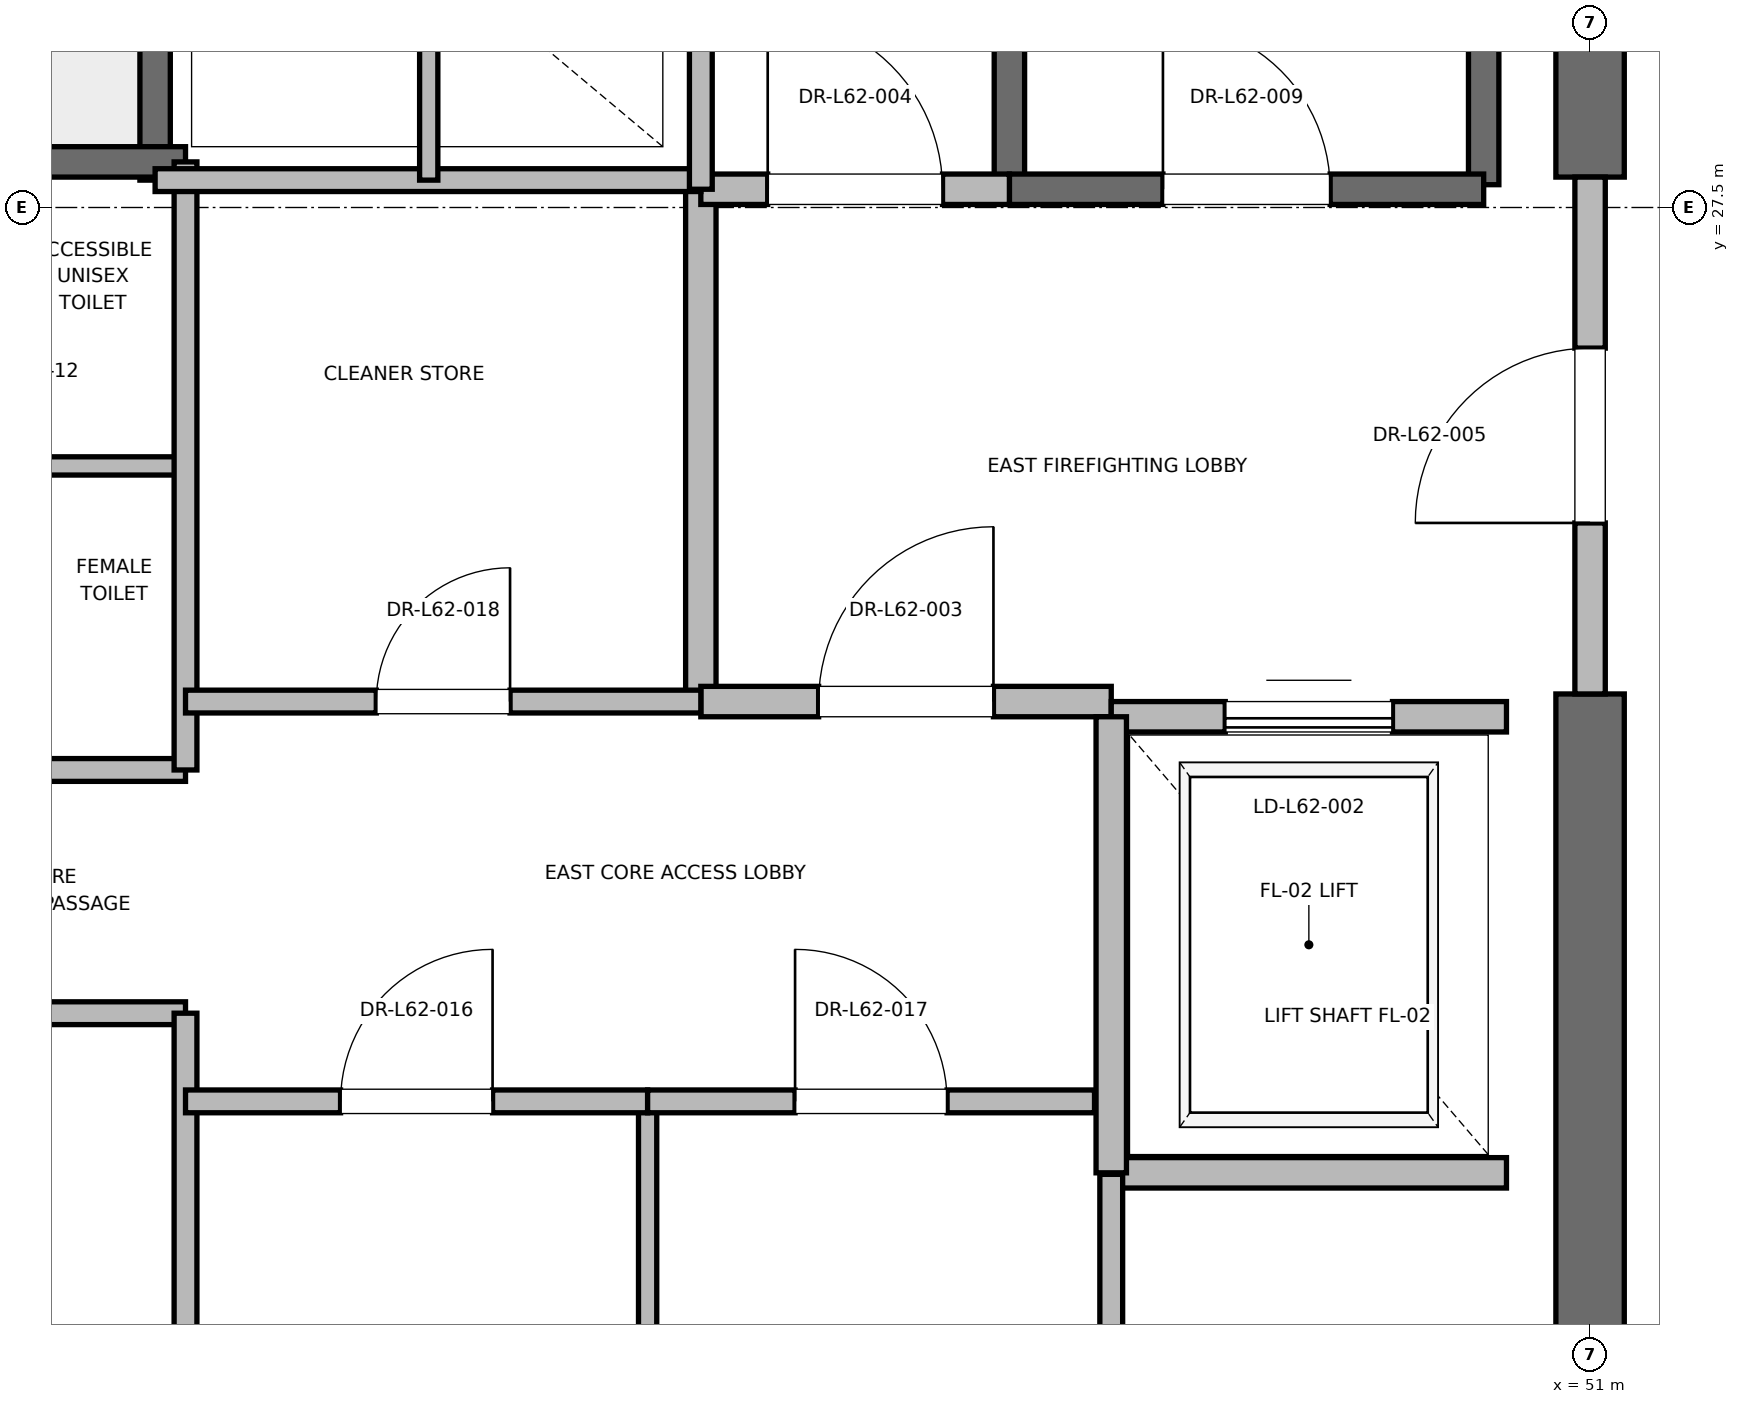
"""IFC4 building model, lengths in metres.
Left out: names, types, materials, properties, quantities, classifications, styles, units other than length and angle.
Written with IfcOpenShell. Run it as: python <this file> out.ifc"""

import sys

from ifc_helpers import new_model, si_unit, direction, frame, frame_2d, origin, place, context, subcontext, project, spatial, rectangle, extrude, element, fill, save


model = new_model("IFC4")
c1 = context("Model", 3, precision=1e-05, world=origin(), true_north=direction((0.0, 1.0)))
c2 = subcontext(c1, "Body", "Model", "MODEL_VIEW")
j1 = project(units=[si_unit("LENGTHUNIT", "METRE"), si_unit("PLANEANGLEUNIT", "RADIAN")], contexts=[c1])
p1 = place(None, origin())
s1 = spatial("IfcSite", under=j1, at=p1, CompositionType="ELEMENT")
p2 = place(p1, origin())
s2 = spatial("IfcBuilding", under=s1, at=p2, CompositionType="ELEMENT")
p3 = place(p2, frame((0.0, 0.0, 267.2)))
s3 = spatial("IfcBuildingStorey", under=s2, at=p3, CompositionType="ELEMENT", Elevation=267.2)
p4 = place(p3, frame((51.0, 18.5, 0.0), z_axis=(0.0, 0.0, 1.0), x_axis=(0.0, 1.0, 0.0)))
e1 = element("IfcWall", 1, at=p4, inside=s3, PredefinedType="SHEAR", context=c2, shape_type="SweptSolid", body=[
    extrude(rectangle(XDim=5.8, YDim=0.45, at=frame_2d((2.9, 0.0))), origin(), (0.0, 0.0, 1.0), 3.785),
])
p5 = place(p3, frame((51.0, 27.7, 0.0), z_axis=(0.0, 0.0, 1.0), x_axis=(0.0, 1.0, 0.0)))
e2 = element("IfcWall", 2, at=p5, inside=s3, PredefinedType="SHEAR", context=c2, shape_type="SweptSolid", body=[
    extrude(rectangle(XDim=8.8, YDim=0.45, at=frame_2d((4.4, 0.0))), origin(), (0.0, 0.0, 1.0), 3.785),
])
p6 = place(p3, frame((50.3, 27.65, 0.0), z_axis=(0.0, 0.0, 1.0), x_axis=(0.0, 1.0, 0.0)))
e3 = element("IfcWall", 3, at=p6, inside=s3, PredefinedType="SOLIDWALL", context=c2, shape_type="SweptSolid", body=[
    extrude(rectangle(XDim=8.15, YDim=0.2, at=frame_2d((4.075, 0.0))), origin(), (0.0, 0.0, 1.0), 3.785),
])
p7 = place(p3, frame((47.18, 27.62, 0.0), z_axis=(0.0, 0.0, 1.0), x_axis=(0.0, 1.0, 0.0)))
e4 = element("IfcWall", 4, at=p7, inside=s3, PredefinedType="SOLIDWALL", context=c2, shape_type="SweptSolid", body=[
    extrude(rectangle(XDim=8.18, YDim=0.2, at=frame_2d((4.09, 0.0))), origin(), (0.0, 0.0, 1.0), 3.785),
])
p8 = place(p3, frame((47.18, 27.62, 0.0), z_axis=(0.0, 0.0, 1.0), x_axis=(1.0, 0.0, 0.0)))
e5 = element("IfcWall", 5, at=p8, inside=s3, PredefinedType="SOLIDWALL", context=c2, shape_type="SweptSolid", body=[
    extrude(rectangle(XDim=3.12, YDim=0.2, at=frame_2d((1.56, 0.0))), origin(), (0.0, 0.0, 1.0), 3.785),
])
p9 = place(p8, frame((1.01, 0.0, 0.0)))
e6 = element("IfcOpeningElement", 6, at=p9, cuts=e5, PredefinedType="OPENING", context=c2, shape_type="SweptSolid", body=[
    extrude(rectangle(XDim=1.1, YDim=2.15, at=frame_2d((0.55, 1.075))), frame((0.0, 0.1, 0.0), z_axis=(0.0, -1.0, 0.0), x_axis=(1.0, 0.0, 0.0)), (0.0, 0.0, 1.0), 0.2),
])
p10 = place(p3, frame((41.56, 27.68, 0.0), z_axis=(0.0, 0.0, 1.0), x_axis=(0.0, 1.0, 0.0)))
e7 = element("IfcWall", 7, at=p10, inside=s3, PredefinedType="SOLIDWALL", context=c2, shape_type="SweptSolid", body=[
    extrude(rectangle(XDim=8.57, YDim=0.2, at=frame_2d((4.285, 0.0))), origin(), (0.0, 0.0, 1.0), 3.785),
])
p11 = place(p3, frame((38.44, 27.8, 0.0), z_axis=(0.0, 0.0, 1.0), x_axis=(1.0, 0.0, 0.0)))
e8 = element("IfcWall", 8, at=p11, inside=s3, PredefinedType="SOLIDWALL", context=c2, shape_type="SweptSolid", body=[
    extrude(rectangle(XDim=3.32, YDim=0.2, at=frame_2d((1.66, 0.0))), origin(), (0.0, 0.0, 1.0), 3.785),
])
p12 = place(p3, frame((45.15, 24.25, 0.0), z_axis=(0.0, 0.0, 1.0), x_axis=(0.0, 1.0, 0.0)))
e9 = element("IfcWall", 9, at=p12, inside=s3, PredefinedType="PARTITIONING", context=c2, shape_type="SweptSolid", body=[
    extrude(rectangle(XDim=3.37, YDim=0.2, at=frame_2d((1.685, 0.0))), origin(), (0.0, 0.0, 1.0), 3.785),
])
p13 = place(p3, frame((45.15, 24.25, 0.0), z_axis=(0.0, 0.0, 1.0), x_axis=(1.0, 0.0, 0.0)))
e10 = element("IfcWall", 10, at=p13, inside=s3, PredefinedType="PARTITIONING", context=c2, shape_type="SweptSolid", body=[
    extrude(rectangle(XDim=2.7, YDim=0.2, at=frame_2d((1.35, 0.0))), origin(), (0.0, 0.0, 1.0), 3.785),
])
p14 = place(p13, frame((0.775, 0.0, 0.0)))
e11 = element("IfcOpeningElement", 11, at=p14, cuts=e10, PredefinedType="OPENING", context=c2, shape_type="SweptSolid", body=[
    extrude(rectangle(XDim=1.15, YDim=2.2, at=frame_2d((0.575, 1.1))), frame((0.0, 0.1, 0.0), z_axis=(0.0, -1.0, 0.0), x_axis=(1.0, 0.0, 0.0)), (0.0, 0.0, 1.0), 0.2),
])
p15 = place(p3, frame((45.15, 27.62, 0.0), z_axis=(0.0, 0.0, 1.0), x_axis=(1.0, 0.0, 0.0)))
e12 = element("IfcWall", 12, at=p15, inside=s3, PredefinedType="PARTITIONING", context=c2, shape_type="SweptSolid", body=[
    extrude(rectangle(XDim=2.03, YDim=0.2, at=frame_2d((1.015, 0.0))), origin(), (0.0, 0.0, 1.0), 3.785),
])
p16 = place(p15, frame((0.44, 0.0, 0.0)))
e13 = element("IfcOpeningElement", 13, at=p16, cuts=e12, PredefinedType="OPENING", context=c2, shape_type="SweptSolid", body=[
    extrude(rectangle(XDim=1.15, YDim=2.2, at=frame_2d((0.575, 1.1))), frame((0.0, 0.1, 0.0), z_axis=(0.0, -1.0, 0.0), x_axis=(1.0, 0.0, 0.0)), (0.0, 0.0, 1.0), 0.2),
])
p17 = place(p3, frame((51.0, 24.3, 0.0), z_axis=(0.0, 0.0, 1.0), x_axis=(0.0, 1.0, 0.0)))
e14 = element("IfcWall", 14, at=p17, inside=s3, PredefinedType="PARTITIONING", context=c2, shape_type="SweptSolid", body=[
    extrude(rectangle(XDim=3.4, YDim=0.2, at=frame_2d((1.7, 0.0))), origin(), (0.0, 0.0, 1.0), 2.865),
])
p18 = place(p17, frame((1.125, 0.0, 0.0)))
e15 = element("IfcOpeningElement", 15, at=p18, cuts=e14, PredefinedType="OPENING", context=c2, shape_type="SweptSolid", body=[
    extrude(rectangle(XDim=1.15, YDim=2.2, at=frame_2d((0.575, 1.1))), frame((0.0, 0.1, 0.0), z_axis=(0.0, -1.0, 0.0), x_axis=(1.0, 0.0, 0.0)), (0.0, 0.0, 1.0), 0.2),
])
p19 = place(p3, frame((47.85, 21.15, 0.0), z_axis=(0.0, 0.0, 1.0), x_axis=(1.0, 0.0, 0.0)))
e16 = element("IfcWall", 16, at=p19, inside=s3, PredefinedType="SOLIDWALL", context=c2, shape_type="SweptSolid", body=[
    extrude(rectangle(XDim=2.6, YDim=0.2, at=frame_2d((1.3, 0.0))), origin(), (0.0, 0.0, 1.0), 3.785),
])
p20 = place(p3, frame((50.45, 24.15, 0.0), z_axis=(0.0, 0.0, 1.0), x_axis=(-1.0, 0.0, 0.0)))
e17 = element("IfcWall", 17, at=p20, inside=s3, PredefinedType="SOLIDWALL", context=c2, shape_type="SweptSolid", body=[
    extrude(rectangle(XDim=2.6, YDim=0.2, at=frame_2d((1.3, 0.0))), origin(), (0.0, 0.0, 1.0), 2.865),
])
p21 = place(p20, frame((0.75, 0.0, 0.0)))
e18 = element("IfcOpeningElement", 18, at=p21, cuts=e17, PredefinedType="OPENING", context=c2, shape_type="SweptSolid", body=[
    extrude(rectangle(XDim=1.1, YDim=2.2, at=frame_2d((0.55, 1.1))), frame((0.0, 0.1, 0.0), z_axis=(0.0, -1.0, 0.0), x_axis=(1.0, 0.0, 0.0)), (0.0, 0.0, 1.0), 0.2),
])
p22 = place(p3, frame((47.85, 24.15, 0.0), z_axis=(0.0, 0.0, 1.0), x_axis=(0.0, -1.0, 0.0)))
e19 = element("IfcWall", 19, at=p22, inside=s3, PredefinedType="SOLIDWALL", context=c2, shape_type="SweptSolid", body=[
    extrude(rectangle(XDim=3.0, YDim=0.2, at=frame_2d((1.5, 0.0))), origin(), (0.0, 0.0, 1.0), 3.785),
])
for number, where, z_axis, x_axis in (
    (20, (39.95, 22.2, 0.0), (0.0, 0.0, 1.0), (1.0, 0.0, 0.0)),
    (21, (39.95, 23.8, 0.0), (0.0, 0.0, 1.0), (1.0, 0.0, 0.0)),
):
    element("IfcWall", number, at=place(p3, frame(where, z_axis=z_axis, x_axis=x_axis)), inside=s3, PredefinedType="PARTITIONING", context=c2, shape_type="SweptSolid", body=[
        extrude(rectangle(XDim=1.81, YDim=0.15, at=frame_2d((0.905, 0.0))), origin(), (0.0, 0.0, 1.0), 2.85),
    ])
p23 = place(p3, frame((39.95, 25.8, 0.0), z_axis=(0.0, 0.0, 1.0), x_axis=(1.0, 0.0, 0.0)))
e22 = element("IfcWall", 22, at=p23, inside=s3, PredefinedType="PARTITIONING", context=c2, shape_type="SweptSolid", body=[
    extrude(rectangle(XDim=1.81, YDim=0.12, at=frame_2d((0.905, 0.0))), origin(), (0.0, 0.0, 1.0), 2.85),
])
p24 = place(p3, frame((41.76, 18.6, 0.0), z_axis=(0.0, 0.0, 1.0), x_axis=(0.0, 1.0, 0.0)))
e23 = element("IfcWall", 23, at=p24, inside=s3, PredefinedType="PARTITIONING", context=c2, shape_type="SweptSolid", body=[
    extrude(rectangle(XDim=3.6, YDim=0.15, at=frame_2d((1.8, 0.0))), origin(), (0.0, 0.0, 1.0), 2.85),
])
p25 = place(p3, frame((41.76, 23.8, 0.0), z_axis=(0.0, 0.0, 1.0), x_axis=(0.0, 1.0, 0.0)))
e24 = element("IfcWall", 24, at=p25, inside=s3, PredefinedType="PARTITIONING", context=c2, shape_type="SweptSolid", body=[
    extrude(rectangle(XDim=4.0, YDim=0.15, at=frame_2d((2.0, 0.0))), origin(), (0.0, 0.0, 1.0), 2.85),
])
p26 = place(p3, frame((41.56, 27.68, 0.0), z_axis=(0.0, 0.0, 1.0), x_axis=(1.0, 0.0, 0.0)))
e25 = element("IfcWall", 25, at=p26, inside=s3, PredefinedType="PARTITIONING", context=c2, shape_type="SweptSolid", body=[
    extrude(rectangle(XDim=3.59, YDim=0.15, at=frame_2d((1.795, 0.0))), origin(), (0.0, 0.0, 1.0), 2.85),
])
p27 = place(p3, frame((47.85, 18.6, 0.0), z_axis=(0.0, 0.0, 1.0), x_axis=(0.0, 1.0, 0.0)))
e26 = element("IfcWall", 26, at=p27, inside=s3, PredefinedType="PARTITIONING", context=c2, shape_type="SweptSolid", body=[
    extrude(rectangle(XDim=2.54, YDim=0.15, at=frame_2d((1.27, 0.0))), origin(), (0.0, 0.0, 1.0), 2.85),
])
p28 = place(p3, frame((44.8, 18.6, 0.0), z_axis=(0.0, 0.0, 1.0), x_axis=(0.0, 1.0, 0.0)))
e27 = element("IfcWall", 27, at=p28, inside=s3, PredefinedType="PARTITIONING", context=c2, shape_type="SweptSolid", body=[
    extrude(rectangle(XDim=3.02, YDim=0.12, at=frame_2d((1.51, 0.0))), origin(), (0.0, 0.0, 1.0), 2.85),
])
p29 = place(p3, frame((41.76, 21.62, 0.0), z_axis=(0.0, 0.0, 1.0), x_axis=(1.0, 0.0, 0.0)))
e28 = element("IfcWall", 28, at=p29, inside=s3, PredefinedType="PARTITIONING", context=c2, shape_type="SweptSolid", body=[
    extrude(rectangle(XDim=3.04, YDim=0.15, at=frame_2d((1.52, 0.0))), origin(), (0.0, 0.0, 1.0), 2.85),
])
p30 = place(p29, frame((1.02, 0.0, 0.0)))
e29 = element("IfcOpeningElement", 29, at=p30, cuts=e28, PredefinedType="OPENING", context=c2, shape_type="SweptSolid", body=[
    extrude(rectangle(XDim=1.0, YDim=2.15, at=frame_2d((0.5, 1.075))), frame((0.0, 0.075, 0.0), z_axis=(0.0, -1.0, 0.0), x_axis=(1.0, 0.0, 0.0)), (0.0, 0.0, 1.0), 0.15),
])
p31 = place(p3, frame((44.8, 21.62, 0.0), z_axis=(0.0, 0.0, 1.0), x_axis=(1.0, 0.0, 0.0)))
e30 = element("IfcWall", 30, at=p31, inside=s3, PredefinedType="PARTITIONING", context=c2, shape_type="SweptSolid", body=[
    extrude(rectangle(XDim=2.94, YDim=0.15, at=frame_2d((1.47, 0.0))), origin(), (0.0, 0.0, 1.0), 2.85),
])
p32 = place(p31, frame((0.97, 0.0, 0.0)))
e31 = element("IfcOpeningElement", 31, at=p32, cuts=e30, PredefinedType="OPENING", context=c2, shape_type="SweptSolid", body=[
    extrude(rectangle(XDim=1.0, YDim=2.15, at=frame_2d((0.5, 1.075))), frame((0.0, 0.075, 0.0), z_axis=(0.0, -1.0, 0.0), x_axis=(1.0, 0.0, 0.0)), (0.0, 0.0, 1.0), 0.15),
])
p33 = place(p3, frame((41.76, 24.25, 0.0), z_axis=(0.0, 0.0, 1.0), x_axis=(1.0, 0.0, 0.0)))
e32 = element("IfcWall", 32, at=p33, inside=s3, PredefinedType="PARTITIONING", context=c2, shape_type="SweptSolid", body=[
    extrude(rectangle(XDim=3.39, YDim=0.15, at=frame_2d((1.695, 0.0))), origin(), (0.0, 0.0, 1.0), 2.85),
])
p34 = place(p33, frame((1.255, 0.0, 0.0)))
e33 = element("IfcOpeningElement", 33, at=p34, cuts=e32, PredefinedType="OPENING", context=c2, shape_type="SweptSolid", body=[
    extrude(rectangle(XDim=0.88, YDim=2.1, at=frame_2d((0.44, 1.05))), frame((0.0, 0.075, 0.0), z_axis=(0.0, -1.0, 0.0), x_axis=(1.0, 0.0, 0.0)), (0.0, 0.0, 1.0), 0.15),
])
p35 = place(p3, frame((45.15, 27.62, 0.0), z_axis=(0.0, 0.0, 1.0), x_axis=(0.0, 1.0, 0.0)))
e34 = element("IfcWall", 34, at=p35, inside=s3, PredefinedType="PARTITIONING", context=c2, shape_type="SweptSolid", body=[
    extrude(rectangle(XDim=3.1, YDim=0.15, at=frame_2d((1.55, 0.0))), origin(), (0.0, 0.0, 1.0), 2.85),
])
p36 = place(p3, frame((43.36, 27.68, 0.0), z_axis=(0.0, 0.0, 1.0), x_axis=(0.0, 1.0, 0.0)))
e35 = element("IfcWall", 35, at=p36, inside=s3, PredefinedType="PARTITIONING", context=c2, shape_type="SweptSolid", body=[
    extrude(rectangle(XDim=3.04, YDim=0.12, at=frame_2d((1.52, 0.0))), origin(), (0.0, 0.0, 1.0), 2.85),
])
p37 = place(p9, origin())
e36 = element("IfcDoor", 36, at=p37, inside=s3, OperationType="SINGLE_SWING_LEFT", PredefinedType="DOOR", context=c2, shape_type="SweptSolid", body=[
    extrude(rectangle(XDim=1.1, YDim=2.15, at=frame_2d((0.55, 1.075))), frame((0.0, 0.025, 0.0), z_axis=(0.0, -1.0, 0.0), x_axis=(1.0, 0.0, 0.0)), (0.0, 0.0, 1.0), 0.05),
])
fill(e6, e36)
p38 = place(p14, origin())
e37 = element("IfcDoor", 37, at=p38, inside=s3, OperationType="SINGLE_SWING_RIGHT", PredefinedType="DOOR", context=c2, shape_type="SweptSolid", body=[
    extrude(rectangle(XDim=1.15, YDim=2.2, at=frame_2d((0.575, 1.1))), frame((0.0, 0.025, 0.0), z_axis=(0.0, -1.0, 0.0), x_axis=(1.0, 0.0, 0.0)), (0.0, 0.0, 1.0), 0.05),
])
fill(e11, e37)
p39 = place(p16, origin())
e38 = element("IfcDoor", 38, at=p39, inside=s3, OperationType="SINGLE_SWING_LEFT", PredefinedType="DOOR", context=c2, shape_type="SweptSolid", body=[
    extrude(rectangle(XDim=1.15, YDim=2.2, at=frame_2d((0.575, 1.1))), frame((0.0, 0.025, 0.0), z_axis=(0.0, -1.0, 0.0), x_axis=(1.0, 0.0, 0.0)), (0.0, 0.0, 1.0), 0.05),
])
fill(e13, e38)
p40 = place(p18, origin())
e39 = element("IfcDoor", 39, at=p40, inside=s3, OperationType="SINGLE_SWING_LEFT", PredefinedType="DOOR", context=c2, shape_type="SweptSolid", body=[
    extrude(rectangle(XDim=1.15, YDim=2.2, at=frame_2d((0.575, 1.1))), frame((0.0, 0.025, 0.0), z_axis=(0.0, -1.0, 0.0), x_axis=(1.0, 0.0, 0.0)), (0.0, 0.0, 1.0), 0.05),
])
fill(e15, e39)
p41 = place(p21, origin())
e40 = element("IfcDoor", 40, at=p41, inside=s3, OperationType="SLIDING_TO_RIGHT", PredefinedType="DOOR", context=c2, shape_type="SweptSolid", body=[
    extrude(rectangle(XDim=1.1, YDim=2.2, at=frame_2d((0.55, 1.1))), frame((0.0, 0.025, 0.0), z_axis=(0.0, -1.0, 0.0), x_axis=(1.0, 0.0, 0.0)), (0.0, 0.0, 1.0), 0.05),
])
fill(e18, e40)
p42 = place(p30, origin())
e41 = element("IfcDoor", 41, at=p42, inside=s3, OperationType="SINGLE_SWING_RIGHT", PredefinedType="DOOR", context=c2, shape_type="SweptSolid", body=[
    extrude(rectangle(XDim=1.0, YDim=2.15, at=frame_2d((0.5, 1.075))), frame((0.0, 0.025, 0.0), z_axis=(0.0, -1.0, 0.0), x_axis=(1.0, 0.0, 0.0)), (0.0, 0.0, 1.0), 0.05),
])
fill(e29, e41)
p43 = place(p32, origin())
e42 = element("IfcDoor", 42, at=p43, inside=s3, OperationType="SINGLE_SWING_LEFT", PredefinedType="DOOR", context=c2, shape_type="SweptSolid", body=[
    extrude(rectangle(XDim=1.0, YDim=2.15, at=frame_2d((0.5, 1.075))), frame((0.0, 0.025, 0.0), z_axis=(0.0, -1.0, 0.0), x_axis=(1.0, 0.0, 0.0)), (0.0, 0.0, 1.0), 0.05),
])
fill(e31, e42)
p44 = place(p34, origin())
e43 = element("IfcDoor", 43, at=p44, inside=s3, OperationType="SINGLE_SWING_RIGHT", PredefinedType="DOOR", context=c2, shape_type="SweptSolid", body=[
    extrude(rectangle(XDim=0.88, YDim=2.1, at=frame_2d((0.44, 1.05))), frame((0.0, 0.025, 0.0), z_axis=(0.0, -1.0, 0.0), x_axis=(1.0, 0.0, 0.0)), (0.0, 0.0, 1.0), 0.05),
])
fill(e33, e43)
save(model, sys.argv[1])
